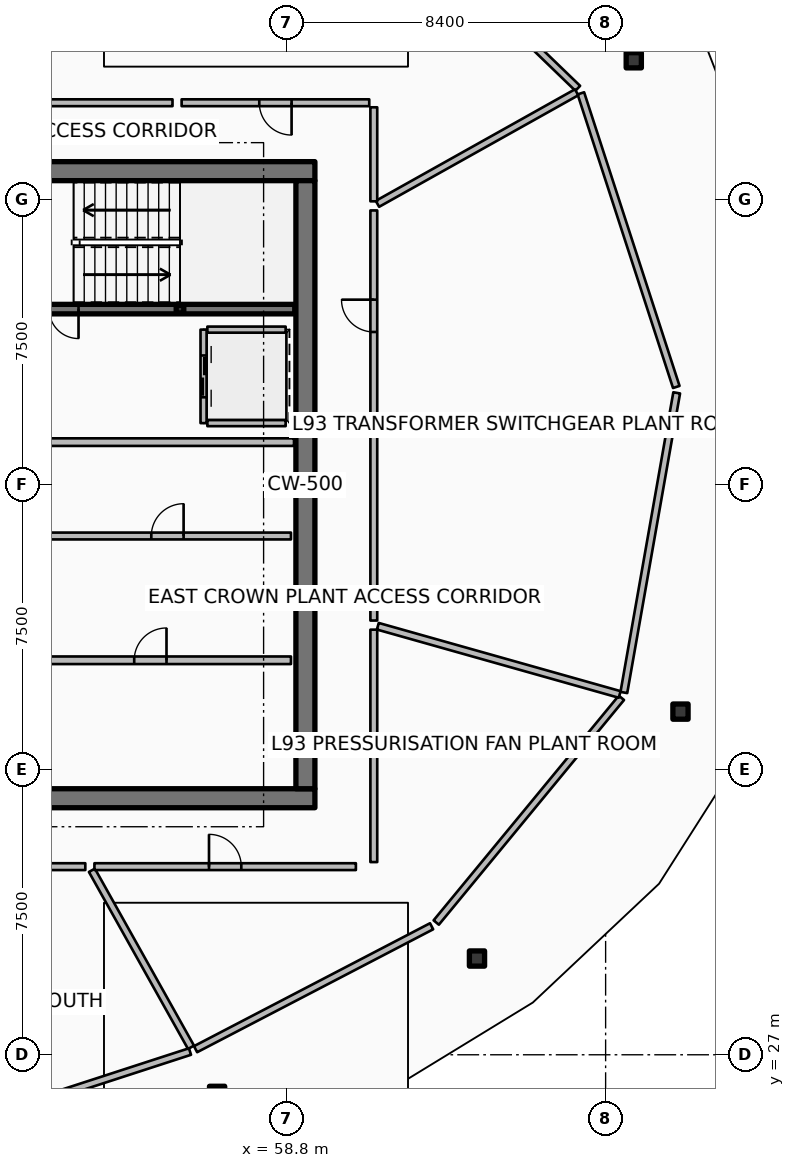
"""IFC4 building model, lengths in metres.
Left out: names, types, materials, properties, quantities, classifications, styles, units other than length and angle.
Written with IfcOpenShell. Run it as: python <this file> out.ifc"""

import sys

from ifc_helpers import new_model, si_unit, direction, frame, frame_2d, origin, origin_2d, place, context, subcontext, project, spatial, rectangle, hollow_rectangle, extrude, element, fill, save


model = new_model("IFC4")
c1 = context("Model", 3, precision=1e-05, world=origin(), true_north=direction((0.0, 1.0)))
c2 = subcontext(c1, "Body", "Model", "MODEL_VIEW")
j1 = project(units=[si_unit("LENGTHUNIT", "METRE"), si_unit("PLANEANGLEUNIT", "RADIAN")], contexts=[c1])
p1 = place(None, origin())
s1 = spatial("IfcSite", under=j1, at=p1, CompositionType="ELEMENT")
p2 = place(p1, origin())
s2 = spatial("IfcBuilding", under=s1, at=p2, CompositionType="ELEMENT")
p3 = place(p2, frame((0.0, 0.0, 370.4)))
s3 = spatial("IfcBuildingStorey", under=s2, at=p3, CompositionType="ELEMENT", Elevation=370.4)
for number, where, z_axis, x_axis in (
    (1, (49.95, 33.75, 0.0), (0.0, 0.0, 1.0), (1.0, 0.0, 0.0)),
    (2, (49.95, 50.25, 0.0), (0.0, 0.0, 1.0), (1.0, 0.0, 0.0)),
):
    element("IfcWall", number, at=place(p3, frame(where, z_axis=z_axis, x_axis=x_axis)), inside=s3, PredefinedType="SHEAR", context=c2, shape_type="SweptSolid", body=[
        extrude(rectangle(XDim=9.6, YDim=0.5, at=frame_2d((4.8, 0.0))), origin(), (0.0, 0.0, 1.0), 3.6),
    ])
p4 = place(p3, frame((59.3, 34.0, 0.0), z_axis=(0.0, 0.0, 1.0), x_axis=(0.0, 1.0, 0.0)))
e3 = element("IfcWall", 3, at=p4, inside=s3, PredefinedType="SHEAR", context=c2, shape_type="SweptSolid", body=[
    extrude(rectangle(XDim=16.0, YDim=0.5, at=frame_2d((8.0, 0.0))), origin(), (0.0, 0.0, 1.0), 3.6),
])
p5 = place(p3, frame((56.0, 46.62, 0.0), z_axis=(0.0, 0.0, 1.0), x_axis=(1.0, 0.0, 0.0)))
e4 = element("IfcColumn", 4, at=p5, inside=s3, PredefinedType="COLUMN", context=c2, shape_type="SweptSolid", body=[
    extrude(hollow_rectangle(XDim=0.2, YDim=0.2, WallThickness=0.01, InnerFilletRadius=0.01, OuterFilletRadius=0.02, at=origin_2d()), origin(), (0.0, 0.0, 1.0), 1.595),
])
for number, where, z_axis, x_axis in (
    (5, (67.941, 53.167, 0.0), (0.0, 0.0, 1.0), (1.0, 0.0, 0.0)),
    (6, (56.977, 25.971, 0.0), (0.0, 0.0, 1.0), (1.0, 0.0, 0.0)),
    (7, (63.815, 29.532, 0.0), (0.0, 0.0, 1.0), (1.0, 0.0, 0.0)),
    (8, (69.17, 36.03, 0.0), (0.0, 0.0, 1.0), (1.0, 0.0, 0.0)),
):
    element("IfcColumn", number, at=place(p3, frame(where, z_axis=z_axis, x_axis=x_axis)), inside=s3, PredefinedType="COLUMN", context=c2, shape_type="SweptSolid", body=[
        extrude(hollow_rectangle(XDim=0.4, YDim=0.4, WallThickness=0.02, InnerFilletRadius=0.02, OuterFilletRadius=0.04, at=origin_2d()), origin(), (0.0, 0.0, 1.0), 3.32),
    ])
p6 = place(p3, frame((51.48, 46.62, 0.0), z_axis=(0.0, 0.0, 1.0), x_axis=(1.0, 0.0, 0.0)))
e9 = element("IfcWall", 9, at=p6, inside=s3, PredefinedType="SOLIDWALL", context=c2, shape_type="SweptSolid", body=[
    extrude(rectangle(XDim=7.54, YDim=0.25, at=frame_2d((3.77, 0.0))), origin(), (0.0, 0.0, 1.0), 3.32),
])
p7 = place(p6, frame((0.3, 0.0, 0.0)))
e10 = element("IfcOpeningElement", 10, at=p7, cuts=e9, PredefinedType="OPENING", context=c2, shape_type="SweptSolid", body=[
    extrude(rectangle(XDim=1.55, YDim=2.15, at=frame_2d((0.775, 1.075))), frame((0.0, 0.135, 0.0), z_axis=(0.0, -1.0, 0.0), x_axis=(1.0, 0.0, 0.0)), (0.0, 0.0, 1.0), 0.27),
])
p8 = place(p3, frame((51.52, 37.38, 0.0), z_axis=(0.0, 0.0, 1.0), x_axis=(1.0, 0.0, 0.0)))
e11 = element("IfcWall", 11, at=p8, inside=s3, PredefinedType="PARTITIONING", context=c2, shape_type="SweptSolid", body=[
    extrude(rectangle(XDim=7.4, YDim=0.2, at=frame_2d((3.7, 0.0))), origin(), (0.0, 0.0, 1.0), 3.32),
])
p9 = place(p8, frame((3.275, 0.0, 0.0)))
e12 = element("IfcOpeningElement", 12, at=p9, cuts=e11, PredefinedType="OPENING", context=c2, shape_type="SweptSolid", body=[
    extrude(rectangle(XDim=0.85, YDim=2.06, at=frame_2d((0.425, 1.03))), frame((0.0, 0.11, 0.0), z_axis=(0.0, -1.0, 0.0), x_axis=(1.0, 0.0, 0.0)), (0.0, 0.0, 1.0), 0.22),
])
p10 = place(p3, frame((56.62, 46.08, 0.0), z_axis=(0.0, 0.0, 1.0), x_axis=(0.0, -1.0, 0.0)))
e13 = element("IfcWall", 13, at=p10, inside=s3, PredefinedType="PARTITIONING", context=c2, shape_type="SweptSolid", body=[
    extrude(rectangle(XDim=2.46, YDim=0.16, at=frame_2d((1.23, 0.0))), origin(), (0.0, 0.0, 1.0), 3.32),
])
p11 = place(p10, frame((0.68, 0.0, 0.0)))
e14 = element("IfcOpeningElement", 14, at=p11, cuts=e13, PredefinedType="OPENING", context=c2, shape_type="SweptSolid", body=[
    extrude(rectangle(XDim=1.1, YDim=2.1, at=frame_2d((0.55, 1.05))), frame((0.0, 0.09, 0.0), z_axis=(0.0, -1.0, 0.0), x_axis=(1.0, 0.0, 0.0)), (0.0, 0.0, 1.0), 0.18),
])
for number, where, z_axis, x_axis in (
    (15, (56.72, 46.08, 0.0), (0.0, 0.0, 1.0), (1.0, 0.0, 0.0)),
    (16, (56.72, 43.62, 0.0), (0.0, 0.0, 1.0), (1.0, 0.0, 0.0)),
):
    element("IfcWall", number, at=place(p3, frame(where, z_axis=z_axis, x_axis=x_axis)), inside=s3, PredefinedType="PARTITIONING", context=c2, shape_type="SweptSolid", body=[
        extrude(rectangle(XDim=2.06, YDim=0.16, at=frame_2d((1.03, 0.0))), origin(), (0.0, 0.0, 1.0), 3.32),
    ])
p12 = place(p3, frame((52.42, 40.65, 0.0), z_axis=(0.0, 0.0, 1.0), x_axis=(1.0, 0.0, 0.0)))
e17 = element("IfcWall", 17, at=p12, inside=s3, PredefinedType="PARTITIONING", context=c2, shape_type="SweptSolid", body=[
    extrude(rectangle(XDim=6.5, YDim=0.18, at=frame_2d((3.25, 0.0))), origin(), (0.0, 0.0, 1.0), 3.32),
])
p13 = place(p12, frame((2.825, 0.0, 0.0)))
e18 = element("IfcOpeningElement", 18, at=p13, cuts=e17, PredefinedType="OPENING", context=c2, shape_type="SweptSolid", body=[
    extrude(rectangle(XDim=0.85, YDim=2.06, at=frame_2d((0.425, 1.03))), frame((0.0, 0.1, 0.0), z_axis=(0.0, -1.0, 0.0), x_axis=(1.0, 0.0, 0.0)), (0.0, 0.0, 1.0), 0.2),
])
p14 = place(p3, frame((50.12, 43.12, 0.0), z_axis=(0.0, 0.0, 1.0), x_axis=(1.0, 0.0, 0.0)))
e19 = element("IfcWall", 19, at=p14, inside=s3, PredefinedType="PARTITIONING", context=c2, shape_type="SweptSolid", body=[
    extrude(rectangle(XDim=8.88, YDim=0.2, at=frame_2d((4.44, 0.0))), origin(), (0.0, 0.0, 1.0), 3.32),
])
p15 = place(p3, frame((66.467, 52.43, 0.0), z_axis=(0.0, 0.0, 1.0), x_axis=(-0.719364153135, 0.694633151516, 0.0)))
e20 = element("IfcWall", 20, at=p15, inside=s3, PredefinedType="PARTITIONING", context=c2, shape_type="SweptSolid", body=[
    extrude(rectangle(XDim=8.006, YDim=0.18, at=frame_2d((4.003, 0.0))), origin(), (0.0, 0.0, 1.0), 2.76),
])
p16 = place(p3, frame((50.082, 25.077, 0.0), z_axis=(0.0, 0.0, 1.0), x_axis=(0.95105283999, 0.309028308649, 0.0)))
e21 = element("IfcWall", 21, at=p16, inside=s3, PredefinedType="PARTITIONING", context=c2, shape_type="SweptSolid", body=[
    extrude(rectangle(XDim=6.499, YDim=0.18, at=frame_2d((3.25, 0.0))), origin(), (0.0, 0.0, 1.0), 2.76),
])
p17 = place(p3, frame((56.41, 27.147, 0.0), z_axis=(0.0, 0.0, 1.0), x_axis=(0.886949494865, 0.461866423935, 0.0)))
e22 = element("IfcWall", 22, at=p17, inside=s3, PredefinedType="PARTITIONING", context=c2, shape_type="SweptSolid", body=[
    extrude(rectangle(XDim=7.002, YDim=0.18, at=frame_2d((3.501, 0.0))), origin(), (0.0, 0.0, 1.0), 2.76),
])
p18 = place(p3, frame((62.742, 30.48, 0.0), z_axis=(0.0, 0.0, 1.0), x_axis=(0.636018833443, 0.771673534278, 0.0)))
e23 = element("IfcWall", 23, at=p18, inside=s3, PredefinedType="PARTITIONING", context=c2, shape_type="SweptSolid", body=[
    extrude(rectangle(XDim=7.661, YDim=0.18, at=frame_2d((3.831, 0.0))), origin(), (0.0, 0.0, 1.0), 2.76),
])
p19 = place(p3, frame((67.68, 36.532, 0.0), z_axis=(0.0, 0.0, 1.0), x_axis=(0.173668776466, 0.984804120666, 0.0)))
e24 = element("IfcWall", 24, at=p19, inside=s3, PredefinedType="PARTITIONING", context=c2, shape_type="SweptSolid", body=[
    extrude(rectangle(XDim=8.006, YDim=0.18, at=frame_2d((4.003, 0.0))), origin(), (0.0, 0.0, 1.0), 2.76),
])
p20 = place(p3, frame((69.059, 44.572, 0.0), z_axis=(0.0, 0.0, 1.0), x_axis=(-0.309024234991, 0.951054163646, 0.0)))
e25 = element("IfcWall", 25, at=p20, inside=s3, PredefinedType="PARTITIONING", context=c2, shape_type="SweptSolid", body=[
    extrude(rectangle(XDim=8.124, YDim=0.18, at=frame_2d((4.062, 0.0))), origin(), (0.0, 0.0, 1.0), 2.76),
])
p21 = place(p3, frame((50.864, 52.156, 0.0), z_axis=(0.0, 0.0, 1.0), x_axis=(0.271457285698, 0.962450488099, 0.0)))
e26 = element("IfcWall", 26, at=p21, inside=s3, PredefinedType="PARTITIONING", context=c2, shape_type="SweptSolid", body=[
    extrude(rectangle(XDim=8.056, YDim=0.18, at=frame_2d((4.028, 0.0))), origin(), (0.0, 0.0, 1.0), 2.76),
])
p22 = place(p3, frame((49.31, 31.95, 0.0), z_axis=(0.0, 0.0, 1.0), x_axis=(1.0, 0.0, 0.0)))
e27 = element("IfcWall", 27, at=p22, inside=s3, PredefinedType="PARTITIONING", context=c2, shape_type="SweptSolid", body=[
    extrude(rectangle(XDim=4.199, YDim=0.18, at=frame_2d((2.099, 0.0))), origin(), (0.0, 0.0, 1.0), 2.76),
])
p23 = place(p22, frame((1.574, 0.0, 0.0)))
e28 = element("IfcOpeningElement", 28, at=p23, cuts=e27, PredefinedType="OPENING", context=c2, shape_type="SweptSolid", body=[
    extrude(rectangle(XDim=1.05, YDim=2.1, at=frame_2d((0.525, 1.05))), frame((0.0, 0.1, 0.0), z_axis=(0.0, -1.0, 0.0), x_axis=(1.0, 0.0, 0.0)), (0.0, 0.0, 1.0), 0.2),
])
p24 = place(p3, frame((53.682, 31.854, 0.0), z_axis=(0.0, 0.0, 1.0), x_axis=(0.488622869326, -0.872495095443, 0.0)))
e29 = element("IfcWall", 29, at=p24, inside=s3, PredefinedType="PARTITIONING", context=c2, shape_type="SweptSolid", body=[
    extrude(rectangle(XDim=5.337, YDim=0.18, at=frame_2d((2.668, 0.0))), origin(), (0.0, 0.0, 1.0), 2.76),
])
p25 = place(p3, frame((53.748, 31.95, 0.0), z_axis=(0.0, 0.0, 1.0), x_axis=(1.0, 0.0, 0.0)))
e30 = element("IfcWall", 30, at=p25, inside=s3, PredefinedType="PARTITIONING", context=c2, shape_type="SweptSolid", body=[
    extrude(rectangle(XDim=6.88, YDim=0.18, at=frame_2d((3.44, 0.0))), origin(), (0.0, 0.0, 1.0), 2.76),
])
p26 = place(p25, frame((3.015, 0.0, 0.0)))
e31 = element("IfcOpeningElement", 31, at=p26, cuts=e30, PredefinedType="OPENING", context=c2, shape_type="SweptSolid", body=[
    extrude(rectangle(XDim=0.85, YDim=2.06, at=frame_2d((0.425, 1.03))), frame((0.0, 0.1, 0.0), z_axis=(0.0, -1.0, 0.0), x_axis=(1.0, 0.0, 0.0)), (0.0, 0.0, 1.0), 0.2),
])
p27 = place(p3, frame((61.1, 32.07, 0.0), z_axis=(0.0, 0.0, 1.0), x_axis=(0.0, 1.0, 0.0)))
e32 = element("IfcWall", 32, at=p27, inside=s3, PredefinedType="PARTITIONING", context=c2, shape_type="SweptSolid", body=[
    extrude(rectangle(XDim=6.115, YDim=0.18, at=frame_2d((3.058, 0.0))), origin(), (0.0, 0.0, 1.0), 2.76),
])
p28 = place(p3, frame((61.206, 38.275, 0.0), z_axis=(0.0, 0.0, 1.0), x_axis=(0.962461547865, -0.271418070294, 0.0)))
e33 = element("IfcWall", 33, at=p28, inside=s3, PredefinedType="PARTITIONING", context=c2, shape_type="SweptSolid", body=[
    extrude(rectangle(XDim=6.612, YDim=0.18, at=frame_2d((3.306, 0.0))), origin(), (0.0, 0.0, 1.0), 2.76),
])
p29 = place(p3, frame((61.1, 38.425, 0.0), z_axis=(0.0, 0.0, 1.0), x_axis=(0.0, 1.0, 0.0)))
e34 = element("IfcWall", 34, at=p29, inside=s3, PredefinedType="PARTITIONING", context=c2, shape_type="SweptSolid", body=[
    extrude(rectangle(XDim=5.005, YDim=0.18, at=frame_2d((2.502, 0.0))), origin(), (0.0, 0.0, 1.0), 2.76),
])
p30 = place(p3, frame((61.1, 43.67, 0.0), z_axis=(0.0, 0.0, 1.0), x_axis=(0.0, 1.0, 0.0)))
e35 = element("IfcWall", 35, at=p30, inside=s3, PredefinedType="PARTITIONING", context=c2, shape_type="SweptSolid", body=[
    extrude(rectangle(XDim=5.546, YDim=0.18, at=frame_2d((2.773, 0.0))), origin(), (0.0, 0.0, 1.0), 2.76),
])
p31 = place(p30, frame((2.348, 0.0, 0.0)))
e36 = element("IfcOpeningElement", 36, at=p31, cuts=e35, PredefinedType="OPENING", context=c2, shape_type="SweptSolid", body=[
    extrude(rectangle(XDim=0.85, YDim=2.06, at=frame_2d((0.425, 1.03))), frame((0.0, 0.1, 0.0), z_axis=(0.0, -1.0, 0.0), x_axis=(1.0, 0.0, 0.0)), (0.0, 0.0, 1.0), 0.2),
])
p32 = place(p3, frame((61.196, 49.39, 0.0), z_axis=(0.0, 0.0, 1.0), x_axis=(0.87249769897, 0.488618220385, 0.0)))
e37 = element("IfcWall", 37, at=p32, inside=s3, PredefinedType="PARTITIONING", context=c2, shape_type="SweptSolid", body=[
    extrude(rectangle(XDim=6.007, YDim=0.18, at=frame_2d((3.003, 0.0))), origin(), (0.0, 0.0, 1.0), 2.76),
])
p33 = place(p3, frame((61.1, 49.456, 0.0), z_axis=(0.0, 0.0, 1.0), x_axis=(0.0, 1.0, 0.0)))
e38 = element("IfcWall", 38, at=p33, inside=s3, PredefinedType="PARTITIONING", context=c2, shape_type="SweptSolid", body=[
    extrude(rectangle(XDim=2.474, YDim=0.18, at=frame_2d((1.237, 0.0))), origin(), (0.0, 0.0, 1.0), 2.76),
])
p34 = place(p3, frame((60.98, 52.05, 0.0), z_axis=(0.0, 0.0, 1.0), x_axis=(-1.0, 0.0, 0.0)))
e39 = element("IfcWall", 39, at=p34, inside=s3, PredefinedType="PARTITIONING", context=c2, shape_type="SweptSolid", body=[
    extrude(rectangle(XDim=4.937, YDim=0.18, at=frame_2d((2.469, 0.0))), origin(), (0.0, 0.0, 1.0), 2.76),
])
p35 = place(p34, frame((2.044, 0.0, 0.0)))
e40 = element("IfcOpeningElement", 40, at=p35, cuts=e39, PredefinedType="OPENING", context=c2, shape_type="SweptSolid", body=[
    extrude(rectangle(XDim=0.85, YDim=2.06, at=frame_2d((0.425, 1.03))), frame((0.0, 0.1, 0.0), z_axis=(0.0, -1.0, 0.0), x_axis=(1.0, 0.0, 0.0)), (0.0, 0.0, 1.0), 0.2),
])
p36 = place(p3, frame((55.803, 52.05, 0.0), z_axis=(0.0, 0.0, 1.0), x_axis=(-1.0, 0.0, 0.0)))
e41 = element("IfcWall", 41, at=p36, inside=s3, PredefinedType="PARTITIONING", context=c2, shape_type="SweptSolid", body=[
    extrude(rectangle(XDim=4.848, YDim=0.18, at=frame_2d((2.424, 0.0))), origin(), (0.0, 0.0, 1.0), 2.76),
])
p37 = place(p7, origin())
e42 = element("IfcDoor", 42, at=p37, inside=s3, OperationType="DOUBLE_DOOR_SINGLE_SWING", PredefinedType="DOOR", context=c2, shape_type="SweptSolid", body=[
    extrude(rectangle(XDim=1.55, YDim=2.15, at=frame_2d((0.775, 1.075))), frame((0.0, 0.025, 0.0), z_axis=(0.0, -1.0, 0.0), x_axis=(1.0, 0.0, 0.0)), (0.0, 0.0, 1.0), 0.05),
])
fill(e10, e42)
p38 = place(p9, origin())
e43 = element("IfcDoor", 43, at=p38, inside=s3, OperationType="SINGLE_SWING_RIGHT", PredefinedType="DOOR", context=c2, shape_type="SweptSolid", body=[
    extrude(rectangle(XDim=0.85, YDim=2.06, at=frame_2d((0.425, 1.03))), frame((0.0, 0.025, 0.0), z_axis=(0.0, -1.0, 0.0), x_axis=(1.0, 0.0, 0.0)), (0.0, 0.0, 1.0), 0.05),
])
fill(e12, e43)
p39 = place(p11, origin())
e44 = element("IfcDoor", 44, at=p39, inside=s3, OperationType="DOUBLE_DOOR_SLIDING", PredefinedType="DOOR", context=c2, shape_type="SweptSolid", body=[
    extrude(rectangle(XDim=1.1, YDim=2.1, at=frame_2d((0.55, 1.05))), frame((0.0, 0.025, 0.0), z_axis=(0.0, -1.0, 0.0), x_axis=(1.0, 0.0, 0.0)), (0.0, 0.0, 1.0), 0.05),
])
fill(e14, e44)
p40 = place(p13, origin())
e45 = element("IfcDoor", 45, at=p40, inside=s3, OperationType="SINGLE_SWING_RIGHT", PredefinedType="DOOR", context=c2, shape_type="SweptSolid", body=[
    extrude(rectangle(XDim=0.85, YDim=2.06, at=frame_2d((0.425, 1.03))), frame((0.0, 0.025, 0.0), z_axis=(0.0, -1.0, 0.0), x_axis=(1.0, 0.0, 0.0)), (0.0, 0.0, 1.0), 0.05),
])
fill(e18, e45)
p41 = place(p26, origin())
e46 = element("IfcDoor", 46, at=p41, inside=s3, OperationType="SINGLE_SWING_LEFT", PredefinedType="DOOR", context=c2, shape_type="SweptSolid", body=[
    extrude(rectangle(XDim=0.85, YDim=2.06, at=frame_2d((0.425, 1.03))), frame((0.0, 0.025, 0.0), z_axis=(0.0, -1.0, 0.0), x_axis=(1.0, 0.0, 0.0)), (0.0, 0.0, 1.0), 0.05),
])
fill(e31, e46)
p42 = place(p31, origin())
e47 = element("IfcDoor", 47, at=p42, inside=s3, OperationType="SINGLE_SWING_RIGHT", PredefinedType="DOOR", context=c2, shape_type="SweptSolid", body=[
    extrude(rectangle(XDim=0.85, YDim=2.06, at=frame_2d((0.425, 1.03))), frame((0.0, 0.025, 0.0), z_axis=(0.0, -1.0, 0.0), x_axis=(1.0, 0.0, 0.0)), (0.0, 0.0, 1.0), 0.05),
])
fill(e36, e47)
p43 = place(p35, origin())
e48 = element("IfcDoor", 48, at=p43, inside=s3, OperationType="SINGLE_SWING_LEFT", PredefinedType="DOOR", context=c2, shape_type="SweptSolid", body=[
    extrude(rectangle(XDim=0.85, YDim=2.06, at=frame_2d((0.425, 1.03))), frame((0.0, 0.025, 0.0), z_axis=(0.0, -1.0, 0.0), x_axis=(1.0, 0.0, 0.0)), (0.0, 0.0, 1.0), 0.05),
])
fill(e40, e48)
save(model, sys.argv[1])
